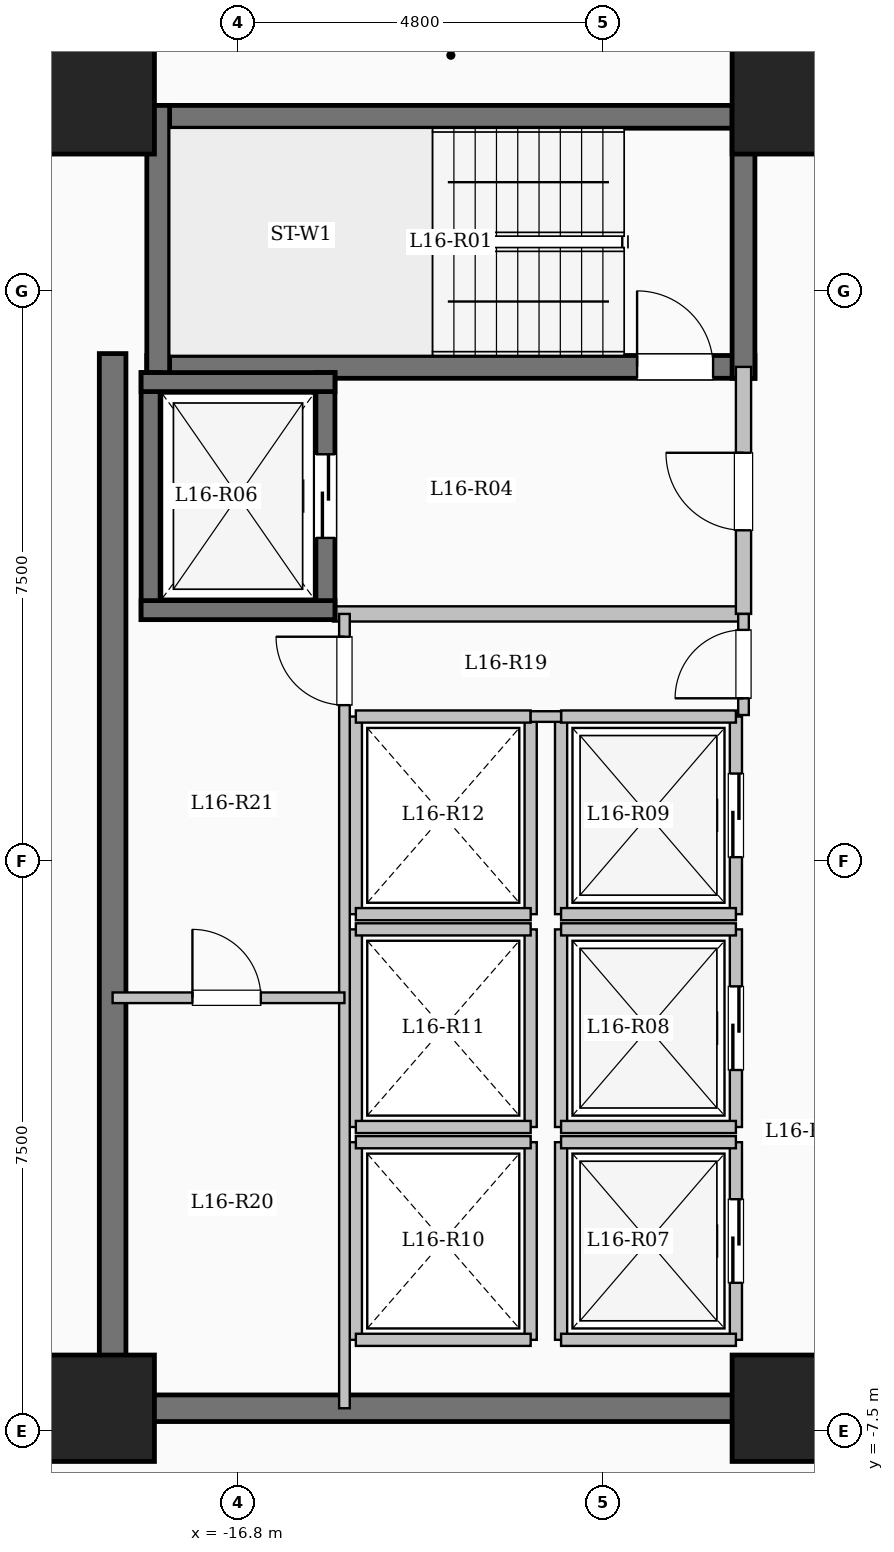
"""IFC4 building model, lengths in metres.
Left out: names, types, materials, properties, quantities, classifications, styles, units other than length and angle.
Written with IfcOpenShell. Run it as: python <this file> out.ifc"""

import sys

from ifc_helpers import new_model, si_unit, direction, frame, frame_2d, origin, origin_2d, place, context, subcontext, project, spatial, rectangle, extrude, element, fill, save


model = new_model("IFC4")
c1 = context("Model", 3, precision=1e-05, world=origin(), true_north=direction((0.0, 1.0)))
c2 = subcontext(c1, "Body", "Model", "MODEL_VIEW")
j1 = project(units=[si_unit("LENGTHUNIT", "METRE"), si_unit("PLANEANGLEUNIT", "RADIAN")], contexts=[c1])
p1 = place(None, origin())
s1 = spatial("IfcSite", under=j1, at=p1, CompositionType="ELEMENT")
p2 = place(p1, origin())
s2 = spatial("IfcBuilding", under=s1, at=p2, CompositionType="ELEMENT")
p3 = place(p2, frame((0.0, 0.0, 60.85)))
s3 = spatial("IfcBuildingStorey", under=s2, at=p3, CompositionType="ELEMENT", Elevation=60.85)
for number, where, z_axis, x_axis in (
    (1, (-9.6, -7.2, 0.0), (0.0, 0.0, 1.0), (1.0, 0.0, 0.0)),
    (2, (-9.6, 10.0, 0.0), (0.0, 0.0, 1.0), (1.0, 0.0, 0.0)),
    (3, (-18.6, -7.2, 0.0), (0.0, 0.0, 1.0), (1.0, 0.0, 0.0)),
    (4, (-18.6, 10.0, 0.0), (0.0, 0.0, 1.0), (1.0, 0.0, 0.0)),
):
    element("IfcColumn", number, at=place(p3, frame(where, z_axis=z_axis, x_axis=x_axis)), inside=s3, PredefinedType="COLUMN", context=c2, shape_type="SweptSolid", body=[
        extrude(rectangle(XDim=1.4, YDim=1.4, at=origin_2d()), origin(), (0.0, 0.0, 1.0), 3.35),
    ])
p4 = place(p3, frame((-18.0, 9.79, 0.0), z_axis=(0.0, 0.0, 1.0), x_axis=(1.0, 0.0, 0.0)))
e5 = element("IfcWall", 5, at=p4, inside=s3, PredefinedType="SHEAR", context=c2, shape_type="SweptSolid", body=[
    extrude(rectangle(XDim=8.0, YDim=0.3, at=frame_2d((4.0, 0.0))), origin(), (0.0, 0.0, 1.0), 3.35),
])
p5 = place(p3, frame((-18.0, 6.5, 0.0), z_axis=(0.0, 0.0, 1.0), x_axis=(1.0, 0.0, 0.0)))
e6 = element("IfcWall", 6, at=p5, inside=s3, PredefinedType="SHEAR", context=c2, shape_type="SweptSolid", body=[
    extrude(rectangle(XDim=8.0, YDim=0.3, at=frame_2d((4.0, 0.0))), origin(), (0.0, 0.0, 1.0), 3.35),
])
p6 = place(p5, frame((6.45, 0.0, 0.0)))
e7 = element("IfcOpeningElement", 7, at=p6, cuts=e6, PredefinedType="OPENING", context=c2, shape_type="SweptSolid", body=[
    extrude(rectangle(XDim=1.0, YDim=2.15, at=frame_2d((0.5, 1.075))), frame((0.0, 0.16, 0.0), z_axis=(0.0, -1.0, 0.0), x_axis=(1.0, 0.0, 0.0)), (0.0, 0.0, 1.0), 0.32),
])
for number, where, z_axis, x_axis in (
    (8, (-17.85, 6.35, 0.0), (0.0, 0.0, 1.0), (0.0, 1.0, 0.0)),
    (9, (-10.15, 6.35, 0.0), (0.0, 0.0, 1.0), (0.0, 1.0, 0.0)),
):
    element("IfcWall", number, at=place(p3, frame(where, z_axis=z_axis, x_axis=x_axis)), inside=s3, PredefinedType="SHEAR", context=c2, shape_type="SweptSolid", body=[
        extrude(rectangle(XDim=3.59, YDim=0.3, at=frame_2d((1.795, 0.0))), origin(), (0.0, 0.0, 1.0), 3.35),
    ])
p7 = place(p3, frame((-15.55, 3.25, 0.0), z_axis=(0.0, 0.0, 1.0), x_axis=(1.0, 0.0, 0.0)))
e10 = element("IfcWall", 10, at=p7, inside=s3, PredefinedType="SOLIDWALL", context=c2, shape_type="SweptSolid", body=[
    extrude(rectangle(XDim=5.4, YDim=0.2, at=frame_2d((2.7, 0.0))), origin(), (0.0, 0.0, 1.0), 3.05),
])
p8 = place(p3, frame((-10.15, 3.25, 0.0), z_axis=(0.0, 0.0, 1.0), x_axis=(0.0, 1.0, 0.0)))
e11 = element("IfcWall", 11, at=p8, inside=s3, PredefinedType="SOLIDWALL", context=c2, shape_type="SweptSolid", body=[
    extrude(rectangle(XDim=3.25, YDim=0.2, at=frame_2d((1.625, 0.0))), origin(), (0.0, 0.0, 1.0), 3.05),
])
p9 = place(p8, frame((1.1, 0.0, 0.0)))
e12 = element("IfcOpeningElement", 12, at=p9, cuts=e11, PredefinedType="OPENING", context=c2, shape_type="SweptSolid", body=[
    extrude(rectangle(XDim=1.02, YDim=2.15, at=frame_2d((0.51, 1.075))), frame((0.0, 0.11, 0.0), z_axis=(0.0, -1.0, 0.0), x_axis=(1.0, 0.0, 0.0)), (0.0, 0.0, 1.0), 0.22),
])
p10 = place(p3, frame((-17.95, 3.175, 0.0), z_axis=(0.0, 0.0, 1.0), x_axis=(0.0, 1.0, 0.0)))
e13 = element("IfcWall", 13, at=p10, inside=s3, PredefinedType="SHEAR", context=c2, shape_type="SweptSolid", body=[
    extrude(rectangle(XDim=3.25, YDim=0.25, at=frame_2d((1.625, 0.0))), origin(), (0.0, 0.0, 1.0), 3.35),
])
p11 = place(p3, frame((-15.65, 3.175, 0.0), z_axis=(0.0, 0.0, 1.0), x_axis=(0.0, 1.0, 0.0)))
e14 = element("IfcWall", 14, at=p11, inside=s3, PredefinedType="SHEAR", context=c2, shape_type="SweptSolid", body=[
    extrude(rectangle(XDim=3.25, YDim=0.25, at=frame_2d((1.625, 0.0))), origin(), (0.0, 0.0, 1.0), 3.35),
])
p12 = place(p11, frame((1.075, 0.0, 0.0)))
e15 = element("IfcOpeningElement", 15, at=p12, cuts=e14, PredefinedType="OPENING", context=c2, shape_type="SweptSolid", body=[
    extrude(rectangle(XDim=1.1, YDim=2.15, at=frame_2d((0.55, 1.075))), frame((0.0, 0.135, 0.0), z_axis=(0.0, -1.0, 0.0), x_axis=(1.0, 0.0, 0.0)), (0.0, 0.0, 1.0), 0.27),
])
for number, where, z_axis, x_axis in (
    (16, (-18.075, 3.3, 0.0), (0.0, 0.0, 1.0), (1.0, 0.0, 0.0)),
    (17, (-18.075, 6.3, 0.0), (0.0, 0.0, 1.0), (1.0, 0.0, 0.0)),
):
    element("IfcWall", number, at=place(p3, frame(where, z_axis=z_axis, x_axis=x_axis)), inside=s3, PredefinedType="SHEAR", context=c2, shape_type="SweptSolid", body=[
        extrude(rectangle(XDim=2.55, YDim=0.25, at=frame_2d((1.275, 0.0))), origin(), (0.0, 0.0, 1.0), 3.35),
    ])
p13 = place(p3, frame((-12.55, -6.3, 0.0), z_axis=(0.0, 0.0, 1.0), x_axis=(0.0, 1.0, 0.0)))
e18 = element("IfcWall", 18, at=p13, inside=s3, PredefinedType="SOLIDWALL", context=c2, shape_type="SweptSolid", body=[
    extrude(rectangle(XDim=2.6, YDim=0.16, at=frame_2d((1.3, 0.0))), origin(), (0.0, 0.0, 1.0), 3.05),
])
p14 = place(p3, frame((-10.25, -6.3, 0.0), z_axis=(0.0, 0.0, 1.0), x_axis=(0.0, 1.0, 0.0)))
e19 = element("IfcWall", 19, at=p14, inside=s3, PredefinedType="SOLIDWALL", context=c2, shape_type="SweptSolid", body=[
    extrude(rectangle(XDim=2.6, YDim=0.16, at=frame_2d((1.3, 0.0))), origin(), (0.0, 0.0, 1.0), 3.05),
])
p15 = place(p14, frame((0.75, 0.0, 0.0)))
e20 = element("IfcOpeningElement", 20, at=p15, cuts=e19, PredefinedType="OPENING", context=c2, shape_type="SweptSolid", body=[
    extrude(rectangle(XDim=1.1, YDim=2.15, at=frame_2d((0.55, 1.075))), frame((0.0, 0.09, 0.0), z_axis=(0.0, -1.0, 0.0), x_axis=(1.0, 0.0, 0.0)), (0.0, 0.0, 1.0), 0.18),
])
for number, where, z_axis, x_axis in (
    (21, (-12.55, -6.3, 0.0), (0.0, 0.0, 1.0), (1.0, 0.0, 0.0)),
    (22, (-12.55, -3.7, 0.0), (0.0, 0.0, 1.0), (1.0, 0.0, 0.0)),
):
    element("IfcWall", number, at=place(p3, frame(where, z_axis=z_axis, x_axis=x_axis)), inside=s3, PredefinedType="SOLIDWALL", context=c2, shape_type="SweptSolid", body=[
        extrude(rectangle(XDim=2.3, YDim=0.16, at=frame_2d((1.15, 0.0))), origin(), (0.0, 0.0, 1.0), 3.05),
    ])
p16 = place(p3, frame((-12.55, -3.5, 0.0), z_axis=(0.0, 0.0, 1.0), x_axis=(0.0, 1.0, 0.0)))
e23 = element("IfcWall", 23, at=p16, inside=s3, PredefinedType="SOLIDWALL", context=c2, shape_type="SweptSolid", body=[
    extrude(rectangle(XDim=2.6, YDim=0.16, at=frame_2d((1.3, 0.0))), origin(), (0.0, 0.0, 1.0), 3.05),
])
p17 = place(p3, frame((-10.25, -3.5, 0.0), z_axis=(0.0, 0.0, 1.0), x_axis=(0.0, 1.0, 0.0)))
e24 = element("IfcWall", 24, at=p17, inside=s3, PredefinedType="SOLIDWALL", context=c2, shape_type="SweptSolid", body=[
    extrude(rectangle(XDim=2.6, YDim=0.16, at=frame_2d((1.3, 0.0))), origin(), (0.0, 0.0, 1.0), 3.05),
])
p18 = place(p17, frame((0.75, 0.0, 0.0)))
e25 = element("IfcOpeningElement", 25, at=p18, cuts=e24, PredefinedType="OPENING", context=c2, shape_type="SweptSolid", body=[
    extrude(rectangle(XDim=1.1, YDim=2.15, at=frame_2d((0.55, 1.075))), frame((0.0, 0.09, 0.0), z_axis=(0.0, -1.0, 0.0), x_axis=(1.0, 0.0, 0.0)), (0.0, 0.0, 1.0), 0.18),
])
for number, where, z_axis, x_axis in (
    (26, (-12.55, -3.5, 0.0), (0.0, 0.0, 1.0), (1.0, 0.0, 0.0)),
    (27, (-12.55, -0.9, 0.0), (0.0, 0.0, 1.0), (1.0, 0.0, 0.0)),
):
    element("IfcWall", number, at=place(p3, frame(where, z_axis=z_axis, x_axis=x_axis)), inside=s3, PredefinedType="SOLIDWALL", context=c2, shape_type="SweptSolid", body=[
        extrude(rectangle(XDim=2.3, YDim=0.16, at=frame_2d((1.15, 0.0))), origin(), (0.0, 0.0, 1.0), 3.05),
    ])
p19 = place(p3, frame((-12.55, -0.7, 0.0), z_axis=(0.0, 0.0, 1.0), x_axis=(0.0, 1.0, 0.0)))
e28 = element("IfcWall", 28, at=p19, inside=s3, PredefinedType="SOLIDWALL", context=c2, shape_type="SweptSolid", body=[
    extrude(rectangle(XDim=2.6, YDim=0.16, at=frame_2d((1.3, 0.0))), origin(), (0.0, 0.0, 1.0), 3.05),
])
p20 = place(p3, frame((-10.25, -0.7, 0.0), z_axis=(0.0, 0.0, 1.0), x_axis=(0.0, 1.0, 0.0)))
e29 = element("IfcWall", 29, at=p20, inside=s3, PredefinedType="SOLIDWALL", context=c2, shape_type="SweptSolid", body=[
    extrude(rectangle(XDim=2.6, YDim=0.16, at=frame_2d((1.3, 0.0))), origin(), (0.0, 0.0, 1.0), 3.05),
])
p21 = place(p20, frame((0.75, 0.0, 0.0)))
e30 = element("IfcOpeningElement", 30, at=p21, cuts=e29, PredefinedType="OPENING", context=c2, shape_type="SweptSolid", body=[
    extrude(rectangle(XDim=1.1, YDim=2.15, at=frame_2d((0.55, 1.075))), frame((0.0, 0.09, 0.0), z_axis=(0.0, -1.0, 0.0), x_axis=(1.0, 0.0, 0.0)), (0.0, 0.0, 1.0), 0.18),
])
for number, where, z_axis, x_axis in (
    (31, (-12.55, -0.7, 0.0), (0.0, 0.0, 1.0), (1.0, 0.0, 0.0)),
    (32, (-12.55, 1.9, 0.0), (0.0, 0.0, 1.0), (1.0, 0.0, 0.0)),
):
    element("IfcWall", number, at=place(p3, frame(where, z_axis=z_axis, x_axis=x_axis)), inside=s3, PredefinedType="SOLIDWALL", context=c2, shape_type="SweptSolid", body=[
        extrude(rectangle(XDim=2.3, YDim=0.16, at=frame_2d((1.15, 0.0))), origin(), (0.0, 0.0, 1.0), 3.05),
    ])
for number, where, z_axis, x_axis in (
    (33, (-15.25, -6.3, 0.0), (0.0, 0.0, 1.0), (0.0, 1.0, 0.0)),
    (34, (-12.95, -6.3, 0.0), (0.0, 0.0, 1.0), (0.0, 1.0, 0.0)),
):
    element("IfcWall", number, at=place(p3, frame(where, z_axis=z_axis, x_axis=x_axis)), inside=s3, PredefinedType="SOLIDWALL", context=c2, shape_type="SweptSolid", body=[
        extrude(rectangle(XDim=2.6, YDim=0.16, at=frame_2d((1.3, 0.0))), origin(), (0.0, 0.0, 1.0), 3.05),
    ])
for number, where, z_axis, x_axis in (
    (35, (-15.25, -6.3, 0.0), (0.0, 0.0, 1.0), (1.0, 0.0, 0.0)),
    (36, (-15.25, -3.7, 0.0), (0.0, 0.0, 1.0), (1.0, 0.0, 0.0)),
):
    element("IfcWall", number, at=place(p3, frame(where, z_axis=z_axis, x_axis=x_axis)), inside=s3, PredefinedType="SOLIDWALL", context=c2, shape_type="SweptSolid", body=[
        extrude(rectangle(XDim=2.3, YDim=0.16, at=frame_2d((1.15, 0.0))), origin(), (0.0, 0.0, 1.0), 3.05),
    ])
for number, where, z_axis, x_axis in (
    (37, (-15.25, -3.5, 0.0), (0.0, 0.0, 1.0), (0.0, 1.0, 0.0)),
    (38, (-12.95, -3.5, 0.0), (0.0, 0.0, 1.0), (0.0, 1.0, 0.0)),
):
    element("IfcWall", number, at=place(p3, frame(where, z_axis=z_axis, x_axis=x_axis)), inside=s3, PredefinedType="SOLIDWALL", context=c2, shape_type="SweptSolid", body=[
        extrude(rectangle(XDim=2.6, YDim=0.16, at=frame_2d((1.3, 0.0))), origin(), (0.0, 0.0, 1.0), 3.05),
    ])
for number, where, z_axis, x_axis in (
    (39, (-15.25, -3.5, 0.0), (0.0, 0.0, 1.0), (1.0, 0.0, 0.0)),
    (40, (-15.25, -0.9, 0.0), (0.0, 0.0, 1.0), (1.0, 0.0, 0.0)),
):
    element("IfcWall", number, at=place(p3, frame(where, z_axis=z_axis, x_axis=x_axis)), inside=s3, PredefinedType="SOLIDWALL", context=c2, shape_type="SweptSolid", body=[
        extrude(rectangle(XDim=2.3, YDim=0.16, at=frame_2d((1.15, 0.0))), origin(), (0.0, 0.0, 1.0), 3.05),
    ])
for number, where, z_axis, x_axis in (
    (41, (-15.25, -0.7, 0.0), (0.0, 0.0, 1.0), (0.0, 1.0, 0.0)),
    (42, (-12.95, -0.7, 0.0), (0.0, 0.0, 1.0), (0.0, 1.0, 0.0)),
):
    element("IfcWall", number, at=place(p3, frame(where, z_axis=z_axis, x_axis=x_axis)), inside=s3, PredefinedType="SOLIDWALL", context=c2, shape_type="SweptSolid", body=[
        extrude(rectangle(XDim=2.6, YDim=0.16, at=frame_2d((1.3, 0.0))), origin(), (0.0, 0.0, 1.0), 3.05),
    ])
for number, where, z_axis, x_axis in (
    (43, (-15.25, -0.7, 0.0), (0.0, 0.0, 1.0), (1.0, 0.0, 0.0)),
    (44, (-15.25, 1.9, 0.0), (0.0, 0.0, 1.0), (1.0, 0.0, 0.0)),
):
    element("IfcWall", number, at=place(p3, frame(where, z_axis=z_axis, x_axis=x_axis)), inside=s3, PredefinedType="SOLIDWALL", context=c2, shape_type="SweptSolid", body=[
        extrude(rectangle(XDim=2.3, YDim=0.16, at=frame_2d((1.15, 0.0))), origin(), (0.0, 0.0, 1.0), 3.05),
    ])
p22 = place(p3, frame((-18.45, -7.375, 0.0), z_axis=(0.0, 0.0, 1.0), x_axis=(0.0, 1.0, 0.0)))
e45 = element("IfcWall", 45, at=p22, inside=s3, PredefinedType="SHEAR", context=c2, shape_type="SweptSolid", body=[
    extrude(rectangle(XDim=14.05, YDim=0.35, at=frame_2d((7.025, 0.0))), origin(), (0.0, 0.0, 1.0), 3.35),
])
p23 = place(p3, frame((-18.625, -7.2, 0.0), z_axis=(0.0, 0.0, 1.0), x_axis=(1.0, 0.0, 0.0)))
e46 = element("IfcWall", 46, at=p23, inside=s3, PredefinedType="SHEAR", context=c2, shape_type="SweptSolid", body=[
    extrude(rectangle(XDim=8.55, YDim=0.35, at=frame_2d((4.275, 0.0))), origin(), (0.0, 0.0, 1.0), 3.35),
])
p24 = place(p3, frame((-12.95, 1.9, 0.0), z_axis=(0.0, 0.0, 1.0), x_axis=(1.0, 0.0, 0.0)))
e47 = element("IfcWall", 47, at=p24, inside=s3, PredefinedType="PARTITIONING", context=c2, shape_type="SweptSolid", body=[
    extrude(rectangle(XDim=0.4, YDim=0.14, at=frame_2d((0.2, 0.0))), origin(), (0.0, 0.0, 1.0), 3.05),
])
p25 = place(p3, frame((-10.15, 1.92, 0.0), z_axis=(0.0, 0.0, 1.0), x_axis=(0.0, 1.0, 0.0)))
e48 = element("IfcWall", 48, at=p25, inside=s3, PredefinedType="PARTITIONING", context=c2, shape_type="SweptSolid", body=[
    extrude(rectangle(XDim=1.33, YDim=0.14, at=frame_2d((0.665, 0.0))), origin(), (0.0, 0.0, 1.0), 3.05),
])
p26 = place(p25, frame((0.22, 0.0, 0.0)))
e49 = element("IfcOpeningElement", 49, at=p26, cuts=e48, PredefinedType="OPENING", context=c2, shape_type="SweptSolid", body=[
    extrude(rectangle(XDim=0.9, YDim=2.08, at=frame_2d((0.45, 1.04))), frame((0.0, 0.08, 0.0), z_axis=(0.0, -1.0, 0.0), x_axis=(1.0, 0.0, 0.0)), (0.0, 0.0, 1.0), 0.16),
])
p27 = place(p3, frame((-15.4, -7.2, 0.0), z_axis=(0.0, 0.0, 1.0), x_axis=(0.0, 1.0, 0.0)))
e50 = element("IfcWall", 50, at=p27, inside=s3, PredefinedType="PARTITIONING", context=c2, shape_type="SweptSolid", body=[
    extrude(rectangle(XDim=10.45, YDim=0.14, at=frame_2d((5.225, 0.0))), origin(), (0.0, 0.0, 1.0), 3.05),
])
p28 = place(p27, frame((9.25, 0.0, 0.0)))
e51 = element("IfcOpeningElement", 51, at=p28, cuts=e50, PredefinedType="OPENING", context=c2, shape_type="SweptSolid", body=[
    extrude(rectangle(XDim=0.9, YDim=2.08, at=frame_2d((0.45, 1.04))), frame((0.0, 0.08, 0.0), z_axis=(0.0, -1.0, 0.0), x_axis=(1.0, 0.0, 0.0)), (0.0, 0.0, 1.0), 0.16),
])
p29 = place(p3, frame((-18.45, -1.8, 0.0), z_axis=(0.0, 0.0, 1.0), x_axis=(1.0, 0.0, 0.0)))
e52 = element("IfcWall", 52, at=p29, inside=s3, PredefinedType="PARTITIONING", context=c2, shape_type="SweptSolid", body=[
    extrude(rectangle(XDim=3.05, YDim=0.14, at=frame_2d((1.525, 0.0))), origin(), (0.0, 0.0, 1.0), 3.05),
])
p30 = place(p29, frame((1.05, 0.0, 0.0)))
e53 = element("IfcOpeningElement", 53, at=p30, cuts=e52, PredefinedType="OPENING", context=c2, shape_type="SweptSolid", body=[
    extrude(rectangle(XDim=0.9, YDim=2.08, at=frame_2d((0.45, 1.04))), frame((0.0, 0.08, 0.0), z_axis=(0.0, -1.0, 0.0), x_axis=(1.0, 0.0, 0.0)), (0.0, 0.0, 1.0), 0.16),
])
p31 = place(p3, frame((-28.68, -7.25, 0.0), z_axis=(0.0, 0.0, 1.0), x_axis=(1.0, 0.0, 0.0)))
e54 = element("IfcWall", 54, at=p31, inside=s3, PredefinedType="PARTITIONING", context=c2, shape_type="SweptSolid", body=[
    extrude(rectangle(XDim=10.23, YDim=0.15, at=frame_2d((5.115, 0.0))), origin(), (0.0, 0.0, 1.0), 3.05),
])
p32 = place(p31, frame((7.03, 0.0, 0.0)))
e55 = element("IfcOpeningElement", 55, at=p32, cuts=e54, PredefinedType="OPENING", context=c2, shape_type="SweptSolid", body=[
    extrude(rectangle(XDim=1.08, YDim=2.15, at=frame_2d((0.54, 1.075))), frame((0.0, 0.085, 0.0), z_axis=(0.0, -1.0, 0.0), x_axis=(1.0, 0.0, 0.0)), (0.0, 0.0, 1.0), 0.17),
])
p33 = place(p6, origin())
e56 = element("IfcDoor", 56, at=p33, inside=s3, OperationType="SINGLE_SWING_LEFT", PredefinedType="DOOR", context=c2, shape_type="SweptSolid", body=[
    extrude(rectangle(XDim=1.0, YDim=2.15, at=frame_2d((0.5, 1.075))), frame((0.0, 0.025, 0.0), z_axis=(0.0, -1.0, 0.0), x_axis=(1.0, 0.0, 0.0)), (0.0, 0.0, 1.0), 0.05),
])
fill(e7, e56)
p34 = place(p9, origin())
e57 = element("IfcDoor", 57, at=p34, inside=s3, OperationType="SINGLE_SWING_RIGHT", PredefinedType="DOOR", context=c2, shape_type="SweptSolid", body=[
    extrude(rectangle(XDim=1.02, YDim=2.15, at=frame_2d((0.51, 1.075))), frame((0.0, 0.025, 0.0), z_axis=(0.0, -1.0, 0.0), x_axis=(1.0, 0.0, 0.0)), (0.0, 0.0, 1.0), 0.05),
])
fill(e12, e57)
p35 = place(p12, origin())
e58 = element("IfcDoor", 58, at=p35, inside=s3, OperationType="SLIDING_TO_LEFT", PredefinedType="DOOR", context=c2, shape_type="SweptSolid", body=[
    extrude(rectangle(XDim=1.1, YDim=2.15, at=frame_2d((0.55, 1.075))), frame((0.0, 0.025, 0.0), z_axis=(0.0, -1.0, 0.0), x_axis=(1.0, 0.0, 0.0)), (0.0, 0.0, 1.0), 0.05),
])
fill(e15, e58)
p36 = place(p15, origin())
e59 = element("IfcDoor", 59, at=p36, inside=s3, OperationType="SLIDING_TO_LEFT", PredefinedType="DOOR", context=c2, shape_type="SweptSolid", body=[
    extrude(rectangle(XDim=1.1, YDim=2.15, at=frame_2d((0.55, 1.075))), frame((0.0, 0.025, 0.0), z_axis=(0.0, -1.0, 0.0), x_axis=(1.0, 0.0, 0.0)), (0.0, 0.0, 1.0), 0.05),
])
fill(e20, e59)
p37 = place(p18, origin())
e60 = element("IfcDoor", 60, at=p37, inside=s3, OperationType="SLIDING_TO_LEFT", PredefinedType="DOOR", context=c2, shape_type="SweptSolid", body=[
    extrude(rectangle(XDim=1.1, YDim=2.15, at=frame_2d((0.55, 1.075))), frame((0.0, 0.025, 0.0), z_axis=(0.0, -1.0, 0.0), x_axis=(1.0, 0.0, 0.0)), (0.0, 0.0, 1.0), 0.05),
])
fill(e25, e60)
p38 = place(p21, origin())
e61 = element("IfcDoor", 61, at=p38, inside=s3, OperationType="SLIDING_TO_LEFT", PredefinedType="DOOR", context=c2, shape_type="SweptSolid", body=[
    extrude(rectangle(XDim=1.1, YDim=2.15, at=frame_2d((0.55, 1.075))), frame((0.0, 0.025, 0.0), z_axis=(0.0, -1.0, 0.0), x_axis=(1.0, 0.0, 0.0)), (0.0, 0.0, 1.0), 0.05),
])
fill(e30, e61)
p39 = place(p26, origin())
e62 = element("IfcDoor", 62, at=p39, inside=s3, OperationType="SINGLE_SWING_LEFT", PredefinedType="DOOR", context=c2, shape_type="SweptSolid", body=[
    extrude(rectangle(XDim=0.9, YDim=2.08, at=frame_2d((0.45, 1.04))), frame((0.0, 0.025, 0.0), z_axis=(0.0, -1.0, 0.0), x_axis=(1.0, 0.0, 0.0)), (0.0, 0.0, 1.0), 0.05),
])
fill(e49, e62)
p40 = place(p28, origin())
e63 = element("IfcDoor", 63, at=p40, inside=s3, OperationType="SINGLE_SWING_RIGHT", PredefinedType="DOOR", context=c2, shape_type="SweptSolid", body=[
    extrude(rectangle(XDim=0.9, YDim=2.08, at=frame_2d((0.45, 1.04))), frame((0.0, 0.025, 0.0), z_axis=(0.0, -1.0, 0.0), x_axis=(1.0, 0.0, 0.0)), (0.0, 0.0, 1.0), 0.05),
])
fill(e51, e63)
p41 = place(p30, origin())
e64 = element("IfcDoor", 64, at=p41, inside=s3, OperationType="SINGLE_SWING_LEFT", PredefinedType="DOOR", context=c2, shape_type="SweptSolid", body=[
    extrude(rectangle(XDim=0.9, YDim=2.08, at=frame_2d((0.45, 1.04))), frame((0.0, 0.025, 0.0), z_axis=(0.0, -1.0, 0.0), x_axis=(1.0, 0.0, 0.0)), (0.0, 0.0, 1.0), 0.05),
])
fill(e53, e64)
save(model, sys.argv[1])
